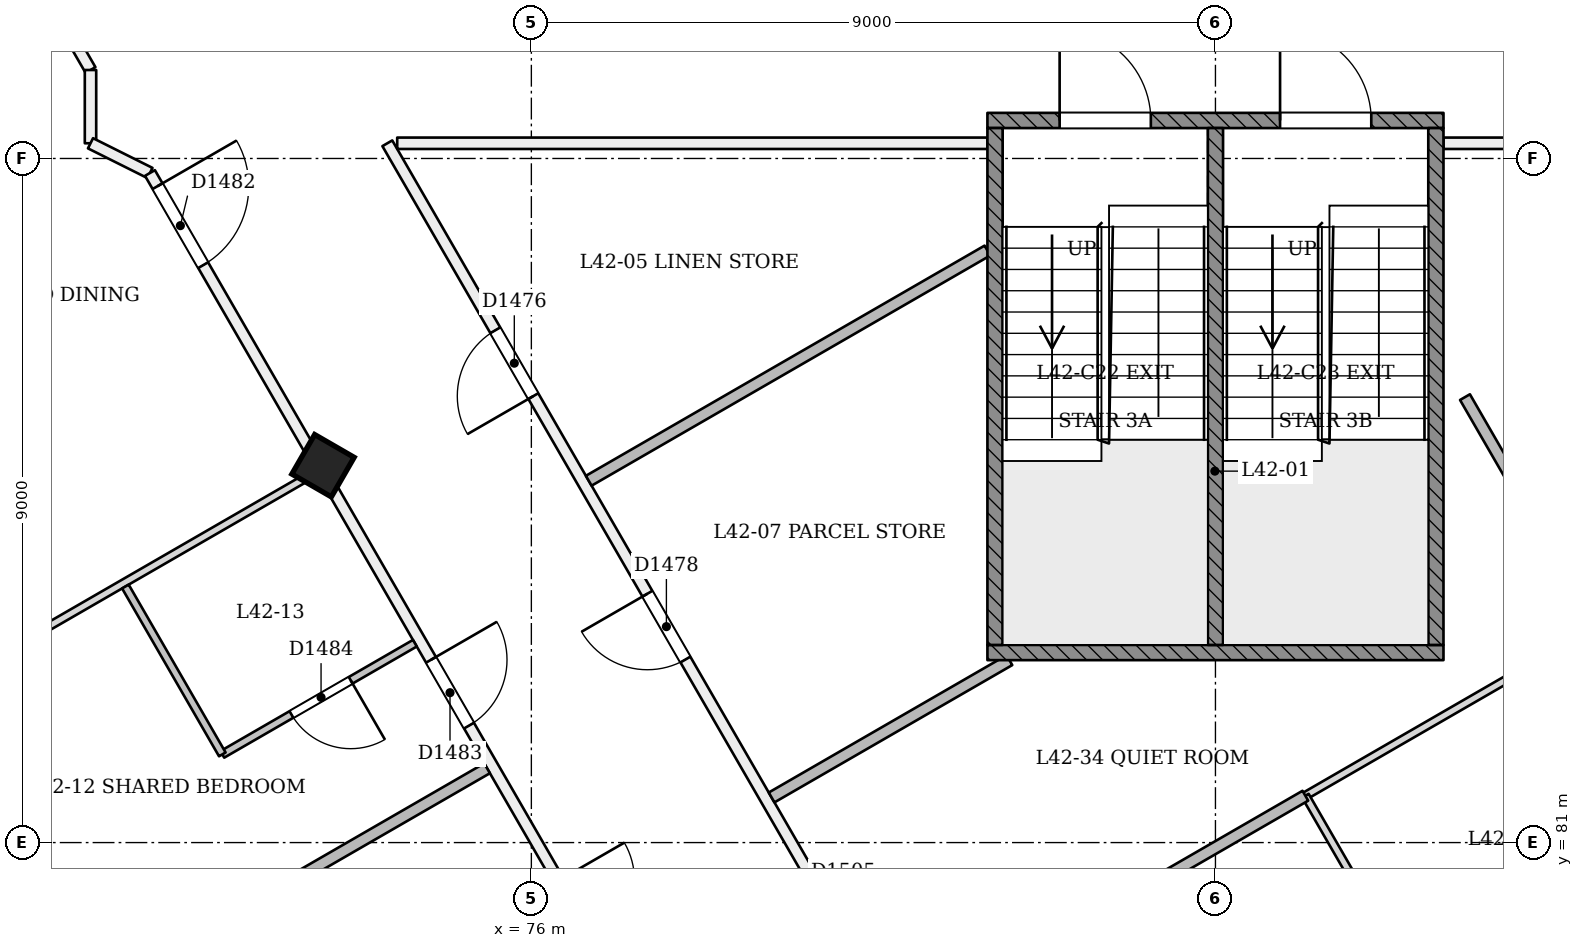
"""IFC4 building model, lengths in metres.
Left out: names, types, materials, properties, quantities, classifications, styles, units other than length and angle.
Written with IfcOpenShell. Run it as: python <this file> out.ifc"""

import sys

from ifc_helpers import new_model, si_unit, direction, frame, frame_2d, origin, origin_2d, place, context, subcontext, project, spatial, rectangle, extrude, element, fill, save


model = new_model("IFC4")
c1 = context("Model", 3, precision=1e-05, world=origin(), true_north=direction((0.0, 1.0)))
c2 = subcontext(c1, "Body", "Model", "MODEL_VIEW")
j1 = project(units=[si_unit("LENGTHUNIT", "METRE"), si_unit("PLANEANGLEUNIT", "RADIAN")], contexts=[c1])
p1 = place(None, origin())
s1 = spatial("IfcSite", under=j1, at=p1, CompositionType="ELEMENT")
p2 = place(p1, origin())
s2 = spatial("IfcBuilding", under=s1, at=p2, CompositionType="ELEMENT")
p3 = place(p2, frame((0.0, 0.0, 163.8)))
s3 = spatial("IfcBuildingStorey", under=s2, at=p3, CompositionType="ELEMENT", Elevation=163.8)
p4 = place(p3, frame((73.232, 85.911, -0.02), z_axis=(0.022212328788, 0.038465252292, 0.999013031354), x_axis=(-0.865637068683, -0.499192077074, 0.038467330417)))
e1 = element("IfcColumn", 1, at=p4, inside=s3, PredefinedType="COLUMN", context=c2, shape_type="SweptSolid", body=[
    extrude(rectangle(XDim=0.6, YDim=0.6, at=origin_2d()), origin(), (0.0, 0.0, 1.0), 3.605),
])
p5 = place(p3, frame((88.0, 90.2, 0.0), z_axis=(0.0, 0.0, 1.0), x_axis=(1.0, 0.0, 0.0)))
e2 = element("IfcWall", 2, at=p5, inside=s3, PredefinedType="PARTITIONING", context=c2, shape_type="SweptSolid", body=[
    extrude(rectangle(XDim=7.765, YDim=0.15, at=frame_2d((3.882, 0.0))), origin(), (0.0, 0.0, 1.0), 3.15),
])
p6 = place(p5, frame((1.674, 0.0, 0.0)))
e3 = element("IfcOpeningElement", 3, at=p6, cuts=e2, PredefinedType="OPENING", context=c2, shape_type="SweptSolid", body=[
    extrude(rectangle(XDim=1.0, YDim=2.1, at=frame_2d((0.5, 1.05))), frame((0.0, 0.085, 0.0), z_axis=(0.0, -1.0, 0.0), x_axis=(1.0, 0.0, 0.0)), (0.0, 0.0, 1.0), 0.171),
])
p7 = place(p3, frame((95.895, 90.2, 0.0), z_axis=(0.0, 0.0, 1.0), x_axis=(-0.499998870956, -0.866026055637, 0.0)))
e4 = element("IfcWall", 4, at=p7, inside=s3, PredefinedType="PARTITIONING", context=c2, shape_type="SweptSolid", body=[
    extrude(rectangle(XDim=21.79, YDim=0.15, at=frame_2d((10.895, 0.0))), origin(), (0.0, 0.0, 1.0), 3.15),
])
p8 = place(p7, frame((2.982, 0.0, 0.0)))
e5 = element("IfcOpeningElement", 5, at=p8, cuts=e4, PredefinedType="OPENING", context=c2, shape_type="SweptSolid", body=[
    extrude(rectangle(XDim=0.9, YDim=2.1, at=frame_2d((0.45, 1.05))), frame((0.0, 0.085, 0.0), z_axis=(0.0, -1.0, 0.0), x_axis=(1.0, 0.0, 0.0)), (0.0, 0.0, 1.0), 0.171),
])
p9 = place(p7, frame((11.061, 0.0, 0.0)))
e6 = element("IfcOpeningElement", 6, at=p9, cuts=e4, PredefinedType="OPENING", context=c2, shape_type="SweptSolid", body=[
    extrude(rectangle(XDim=0.9, YDim=2.1, at=frame_2d((0.45, 1.05))), frame((0.0, 0.085, 0.0), z_axis=(0.0, -1.0, 0.0), x_axis=(1.0, 0.0, 0.0)), (0.0, 0.0, 1.0), 0.171),
])
p10 = place(p7, frame((17.72, 0.0, 0.0)))
e7 = element("IfcOpeningElement", 7, at=p10, cuts=e4, PredefinedType="OPENING", context=c2, shape_type="SweptSolid", body=[
    extrude(rectangle(XDim=1.0, YDim=2.1, at=frame_2d((0.5, 1.05))), frame((0.0, 0.085, 0.0), z_axis=(0.0, -1.0, 0.0), x_axis=(1.0, 0.0, 0.0)), (0.0, 0.0, 1.0), 0.171),
])
p11 = place(p3, frame((84.935, 71.442, 0.0), z_axis=(0.0, 0.0, 1.0), x_axis=(-0.499995323145, 0.866028103951, 0.0)))
e8 = element("IfcWall", 8, at=p11, inside=s3, PredefinedType="PARTITIONING", context=c2, shape_type="SweptSolid", body=[
    extrude(rectangle(XDim=21.66, YDim=0.15, at=frame_2d((10.83, 0.0))), origin(), (0.0, 0.0, 1.0), 3.15),
])
p12 = place(p11, frame((17.819, 0.0, 0.0)))
e9 = element("IfcOpeningElement", 9, at=p12, cuts=e8, PredefinedType="OPENING", context=c2, shape_type="SweptSolid", body=[
    extrude(rectangle(XDim=1.0, YDim=2.1, at=frame_2d((0.5, 1.05))), frame((0.0, 0.085, 0.0), z_axis=(0.0, -1.0, 0.0), x_axis=(1.0, 0.0, 0.0)), (0.0, 0.0, 1.0), 0.171),
])
p13 = place(p11, frame((13.817, 0.0, 0.0)))
e10 = element("IfcOpeningElement", 10, at=p13, cuts=e8, PredefinedType="OPENING", context=c2, shape_type="SweptSolid", body=[
    extrude(rectangle(XDim=1.0, YDim=2.1, at=frame_2d((0.5, 1.05))), frame((0.0, 0.085, 0.0), z_axis=(0.0, -1.0, 0.0), x_axis=(1.0, 0.0, 0.0)), (0.0, 0.0, 1.0), 0.171),
])
p14 = place(p11, frame((9.162, 0.0, 0.0)))
e11 = element("IfcOpeningElement", 11, at=p14, cuts=e8, PredefinedType="OPENING", context=c2, shape_type="SweptSolid", body=[
    extrude(rectangle(XDim=1.0, YDim=2.1, at=frame_2d((0.5, 1.05))), frame((0.0, 0.085, 0.0), z_axis=(0.0, -1.0, 0.0), x_axis=(1.0, 0.0, 0.0)), (0.0, 0.0, 1.0), 0.171),
])
p15 = place(p11, frame((5.788, 0.0, 0.0)))
e12 = element("IfcOpeningElement", 12, at=p15, cuts=e8, PredefinedType="OPENING", context=c2, shape_type="SweptSolid", body=[
    extrude(rectangle(XDim=1.0, YDim=2.1, at=frame_2d((0.5, 1.05))), frame((0.0, 0.085, 0.0), z_axis=(0.0, -1.0, 0.0), x_axis=(1.0, 0.0, 0.0)), (0.0, 0.0, 1.0), 0.171),
])
p16 = place(p3, frame((74.235, 90.2, 0.0), z_axis=(0.0, 0.0, 1.0), x_axis=(1.0, 0.0, 0.0)))
e13 = element("IfcWall", 13, at=p16, inside=s3, PredefinedType="PARTITIONING", context=c2, shape_type="SweptSolid", body=[
    extrude(rectangle(XDim=7.765, YDim=0.15, at=frame_2d((3.882, 0.0))), origin(), (0.0, 0.0, 1.0), 3.15),
])
p17 = place(p3, frame((66.482, 97.603, 0.0), z_axis=(0.0, 0.0, 1.0), x_axis=(0.499995303914, -0.866028115054, 0.0)))
e14 = element("IfcWall", 14, at=p17, inside=s3, PredefinedType="PARTITIONING", context=c2, shape_type="SweptSolid", body=[
    extrude(rectangle(XDim=7.436, YDim=0.15, at=frame_2d((3.718, 0.0))), origin(), (0.0, 0.0, 1.0), 2.75),
])
p18 = place(p17, frame((0.571, 0.0, 0.0)))
e15 = element("IfcOpeningElement", 15, at=p18, cuts=e14, PredefinedType="OPENING", context=c2, shape_type="SweptSolid", body=[
    extrude(rectangle(XDim=1.1, YDim=2.1, at=frame_2d((0.55, 1.05))), frame((0.0, 0.085, 0.0), z_axis=(0.0, -1.0, 0.0), x_axis=(1.0, 0.0, 0.0)), (0.0, 0.0, 1.0), 0.171),
])
p19 = place(p3, frame((70.2, 91.164, 0.0), z_axis=(0.0, 0.0, 1.0), x_axis=(0.0, -1.0, 0.0)))
e16 = element("IfcWall", 16, at=p19, inside=s3, PredefinedType="PARTITIONING", context=c2, shape_type="SweptSolid", body=[
    extrude(rectangle(XDim=0.964, YDim=0.15, at=frame_2d((0.482, 0.0))), origin(), (0.0, 0.0, 1.0), 3.15),
])
p20 = place(p3, frame((70.2, 90.2, 0.0), z_axis=(0.0, 0.0, 1.0), x_axis=(0.89453884087, -0.44699022604, 0.0)))
e17 = element("IfcWall", 17, at=p20, inside=s3, PredefinedType="PARTITIONING", context=c2, shape_type="SweptSolid", body=[
    extrude(rectangle(XDim=0.875, YDim=0.15, at=frame_2d((0.437, 0.0))), origin(), (0.0, 0.0, 1.0), 3.15),
])
p21 = place(p3, frame((70.982, 89.809, 0.0), z_axis=(0.0, 0.0, 1.0), x_axis=(0.500000607917, -0.866025052803, 0.0)))
e18 = element("IfcWall", 18, at=p21, inside=s3, PredefinedType="PARTITIONING", context=c2, shape_type="SweptSolid", body=[
    extrude(rectangle(XDim=28.036, YDim=0.15, at=frame_2d((14.018, 0.0))), origin(), (0.0, 0.0, 1.0), 2.75),
])
p22 = place(p21, frame((0.2, 0.0, 0.0)))
e19 = element("IfcOpeningElement", 19, at=p22, cuts=e18, PredefinedType="OPENING", context=c2, shape_type="SweptSolid", body=[
    extrude(rectangle(XDim=1.2, YDim=2.1, at=frame_2d((0.6, 1.05))), frame((0.0, 0.085, 0.0), z_axis=(0.0, -1.0, 0.0), x_axis=(1.0, 0.0, 0.0)), (0.0, 0.0, 1.0), 0.171),
])
p23 = place(p21, frame((7.395, 0.0, 0.0)))
e20 = element("IfcOpeningElement", 20, at=p23, cuts=e18, PredefinedType="OPENING", context=c2, shape_type="SweptSolid", body=[
    extrude(rectangle(XDim=1.0, YDim=2.1, at=frame_2d((0.5, 1.05))), frame((0.0, 0.085, 0.0), z_axis=(0.0, -1.0, 0.0), x_axis=(1.0, 0.0, 0.0)), (0.0, 0.0, 1.0), 0.171),
])
p24 = place(p21, frame((10.75, 0.0, 0.0)))
e21 = element("IfcOpeningElement", 21, at=p24, cuts=e18, PredefinedType="OPENING", context=c2, shape_type="SweptSolid", body=[
    extrude(rectangle(XDim=1.0, YDim=2.1, at=frame_2d((0.5, 1.05))), frame((0.0, 0.085, 0.0), z_axis=(0.0, -1.0, 0.0), x_axis=(1.0, 0.0, 0.0)), (0.0, 0.0, 1.0), 0.171),
])
p25 = place(p21, frame((16.28, 0.0, 0.0)))
e22 = element("IfcOpeningElement", 22, at=p25, cuts=e18, PredefinedType="OPENING", context=c2, shape_type="SweptSolid", body=[
    extrude(rectangle(XDim=1.0, YDim=2.1, at=frame_2d((0.5, 1.05))), frame((0.0, 0.085, 0.0), z_axis=(0.0, -1.0, 0.0), x_axis=(1.0, 0.0, 0.0)), (0.0, 0.0, 1.0), 0.171),
])
p26 = place(p21, frame((18.72, 0.0, 0.0)))
e23 = element("IfcOpeningElement", 23, at=p26, cuts=e18, PredefinedType="OPENING", context=c2, shape_type="SweptSolid", body=[
    extrude(rectangle(XDim=1.0, YDim=2.1, at=frame_2d((0.5, 1.05))), frame((0.0, 0.085, 0.0), z_axis=(0.0, -1.0, 0.0), x_axis=(1.0, 0.0, 0.0)), (0.0, 0.0, 1.0), 0.171),
])
p27 = place(p21, frame((26.228, 0.0, 0.0)))
e24 = element("IfcOpeningElement", 24, at=p27, cuts=e18, PredefinedType="OPENING", context=c2, shape_type="SweptSolid", body=[
    extrude(rectangle(XDim=1.2, YDim=2.1, at=frame_2d((0.6, 1.05))), frame((0.0, 0.085, 0.0), z_axis=(0.0, -1.0, 0.0), x_axis=(1.0, 0.0, 0.0)), (0.0, 0.0, 1.0), 0.171),
])
p28 = place(p3, frame((85.065, 65.642, 0.0), z_axis=(0.0, 0.0, 1.0), x_axis=(0.500001650589, 0.866024450814, 0.0)))
e25 = element("IfcWall", 25, at=p28, inside=s3, PredefinedType="PARTITIONING", context=c2, shape_type="SweptSolid", body=[
    extrude(rectangle(XDim=27.906, YDim=0.15, at=frame_2d((13.953, 0.0))), origin(), (0.0, 0.0, 1.0), 2.75),
])
p29 = place(p28, frame((2.656, 0.0, 0.0)))
e26 = element("IfcOpeningElement", 26, at=p29, cuts=e25, PredefinedType="OPENING", context=c2, shape_type="SweptSolid", body=[
    extrude(rectangle(XDim=1.0, YDim=2.1, at=frame_2d((0.5, 1.05))), frame((0.0, 0.085, 0.0), z_axis=(0.0, -1.0, 0.0), x_axis=(1.0, 0.0, 0.0)), (0.0, 0.0, 1.0), 0.171),
])
p30 = place(p28, frame((8.185, 0.0, 0.0)))
e27 = element("IfcOpeningElement", 27, at=p30, cuts=e25, PredefinedType="OPENING", context=c2, shape_type="SweptSolid", body=[
    extrude(rectangle(XDim=1.0, YDim=2.1, at=frame_2d((0.5, 1.05))), frame((0.0, 0.085, 0.0), z_axis=(0.0, -1.0, 0.0), x_axis=(1.0, 0.0, 0.0)), (0.0, 0.0, 1.0), 0.171),
])
p31 = place(p28, frame((10.626, 0.0, 0.0)))
e28 = element("IfcOpeningElement", 28, at=p31, cuts=e25, PredefinedType="OPENING", context=c2, shape_type="SweptSolid", body=[
    extrude(rectangle(XDim=1.0, YDim=2.1, at=frame_2d((0.5, 1.05))), frame((0.0, 0.085, 0.0), z_axis=(0.0, -1.0, 0.0), x_axis=(1.0, 0.0, 0.0)), (0.0, 0.0, 1.0), 0.171),
])
p32 = place(p28, frame((16.156, 0.0, 0.0)))
e29 = element("IfcOpeningElement", 29, at=p32, cuts=e25, PredefinedType="OPENING", context=c2, shape_type="SweptSolid", body=[
    extrude(rectangle(XDim=1.0, YDim=2.1, at=frame_2d((0.5, 1.05))), frame((0.0, 0.085, 0.0), z_axis=(0.0, -1.0, 0.0), x_axis=(1.0, 0.0, 0.0)), (0.0, 0.0, 1.0), 0.171),
])
p33 = place(p28, frame((19.626, 0.0, 0.0)))
e30 = element("IfcOpeningElement", 30, at=p33, cuts=e25, PredefinedType="OPENING", context=c2, shape_type="SweptSolid", body=[
    extrude(rectangle(XDim=1.0, YDim=2.1, at=frame_2d((0.5, 1.05))), frame((0.0, 0.085, 0.0), z_axis=(0.0, -1.0, 0.0), x_axis=(1.0, 0.0, 0.0)), (0.0, 0.0, 1.0), 0.171),
])
p34 = place(p28, frame((26.235, 0.0, 0.0)))
e31 = element("IfcOpeningElement", 31, at=p34, cuts=e25, PredefinedType="OPENING", context=c2, shape_type="SweptSolid", body=[
    extrude(rectangle(XDim=1.1, YDim=2.1, at=frame_2d((0.55, 1.05))), frame((0.0, 0.085, 0.0), z_axis=(0.0, -1.0, 0.0), x_axis=(1.0, 0.0, 0.0)), (0.0, 0.0, 1.0), 0.171),
])
p35 = place(p3, frame((90.029, 83.837, 0.0), z_axis=(0.0, 0.0, 1.0), x_axis=(-0.866011499294, -0.50002408251, 0.0)))
e32 = element("IfcWall", 32, at=p35, inside=s3, PredefinedType="PARTITIONING", context=c2, shape_type="SweptSolid", body=[
    extrude(rectangle(XDim=4.461, YDim=0.1, at=frame_2d((2.23, 0.0))), origin(), (0.0, 0.0, 1.0), 3.15),
])
p36 = place(p3, frame((86.183, 81.616, 0.0), z_axis=(0.0, 0.0, 1.0), x_axis=(0.500009360108, -0.866019999656, 0.0)))
e33 = element("IfcWall", 33, at=p36, inside=s3, PredefinedType="PARTITIONING", context=c2, shape_type="SweptSolid", body=[
    extrude(rectangle(XDim=4.641, YDim=0.1, at=frame_2d((2.32, 0.0))), origin(), (0.0, 0.0, 1.0), 3.15),
])
p37 = place(p3, frame((76.755, 85.76, 0.0), z_axis=(0.0, 0.0, 1.0), x_axis=(0.866021793822, 0.500006252586, 0.0)))
e34 = element("IfcWall", 34, at=p37, inside=s3, PredefinedType="PARTITIONING", context=c2, shape_type="SweptSolid", body=[
    extrude(rectangle(XDim=6.057, YDim=0.15, at=frame_2d((3.028, 0.0))), origin(), (0.0, 0.0, 1.0), 3.15),
])
p38 = place(p3, frame((88.283, 86.86, 0.0), z_axis=(0.0, 0.0, 1.0), x_axis=(0.499974664501, -0.866040030748, 0.0)))
e35 = element("IfcWall", 35, at=p38, inside=s3, PredefinedType="PARTITIONING", context=c2, shape_type="SweptSolid", body=[
    extrude(rectangle(XDim=3.491, YDim=0.15, at=frame_2d((1.746, 0.0))), origin(), (0.0, 0.0, 1.0), 3.15),
])
p39 = place(p3, frame((79.161, 81.594, 0.0), z_axis=(0.0, 0.0, 1.0), x_axis=(0.866017903742, 0.500012990229, 0.0)))
e36 = element("IfcWall", 36, at=p39, inside=s3, PredefinedType="PARTITIONING", context=c2, shape_type="SweptSolid", body=[
    extrude(rectangle(XDim=3.613, YDim=0.15, at=frame_2d((1.806, 0.0))), origin(), (0.0, 0.0, 1.0), 3.15),
])
p40 = place(p3, frame((67.69, 82.712, 0.0), z_axis=(0.0, 0.0, 1.0), x_axis=(0.866032601554, 0.49998753289, 0.0)))
e37 = element("IfcWall", 37, at=p40, inside=s3, PredefinedType="PARTITIONING", context=c2, shape_type="SweptSolid", body=[
    extrude(rectangle(XDim=6.325, YDim=0.1, at=frame_2d((3.163, 0.0))), origin(), (0.0, 0.0, 1.0), 2.65),
])
p41 = place(p3, frame((74.467, 83.623, 0.0), z_axis=(0.0, 0.0, 1.0), x_axis=(-0.86601045545, -0.500025890382, 0.0)))
e38 = element("IfcWall", 38, at=p41, inside=s3, PredefinedType="PARTITIONING", context=c2, shape_type="SweptSolid", body=[
    extrude(rectangle(XDim=2.925, YDim=0.1, at=frame_2d((1.462, 0.0))), origin(), (0.0, 0.0, 1.0), 3.15),
])
p42 = place(p41, frame((0.975, 0.0, 0.0)))
e39 = element("IfcOpeningElement", 39, at=p42, cuts=e38, PredefinedType="OPENING", context=c2, shape_type="SweptSolid", body=[
    extrude(rectangle(XDim=0.9, YDim=2.1, at=frame_2d((0.45, 1.05))), frame((0.0, 0.061, 0.0), z_axis=(0.0, -1.0, 0.0), x_axis=(1.0, 0.0, 0.0)), (0.0, 0.0, 1.0), 0.121),
])
p43 = place(p3, frame((71.934, 82.16, 0.0), z_axis=(0.0, 0.0, 1.0), x_axis=(-0.499948979701, 0.866054858364, 0.0)))
e40 = element("IfcWall", 40, at=p43, inside=s3, PredefinedType="PARTITIONING", context=c2, shape_type="SweptSolid", body=[
    extrude(rectangle(XDim=2.55, YDim=0.1, at=frame_2d((1.275, 0.0))), origin(), (0.0, 0.0, 1.0), 2.75),
])
p44 = place(p3, frame((69.922, 78.805, 0.0), z_axis=(0.0, 0.0, 1.0), x_axis=(0.866025401434, 0.500000004071, 0.0)))
e41 = element("IfcWall", 41, at=p44, inside=s3, PredefinedType="PARTITIONING", context=c2, shape_type="SweptSolid", body=[
    extrude(rectangle(XDim=6.345, YDim=0.15, at=frame_2d((3.173, 0.0))), origin(), (0.0, 0.0, 1.0), 2.65),
])
p45 = place(p3, frame((80.906, 78.57, 0.0), z_axis=(0.0, 0.0, 1.0), x_axis=(0.866020094525, 0.500009195793, 0.0)))
e42 = element("IfcWall", 42, at=p45, inside=s3, PredefinedType="PARTITIONING", context=c2, shape_type="SweptSolid", body=[
    extrude(rectangle(XDim=6.093, YDim=0.15, at=frame_2d((3.046, 0.0))), origin(), (0.0, 0.0, 1.0), 3.15),
])
p46 = place(p3, frame((82.0, 90.5, 0.0), z_axis=(0.0, 0.0, 1.0), x_axis=(1.0, 0.0, 0.0)))
e43 = element("IfcWall", 43, at=p46, inside=s3, PredefinedType="SOLIDWALL", context=c2, shape_type="SweptSolid", body=[
    extrude(rectangle(XDim=6.0, YDim=0.2, at=frame_2d((3.0, 0.0))), origin(), (0.0, 0.0, 1.0), 3.15),
])
p47 = place(p46, frame((0.95, 0.0, 0.0)))
e44 = element("IfcOpeningElement", 44, at=p47, cuts=e43, PredefinedType="OPENING", context=c2, shape_type="SweptSolid", body=[
    extrude(rectangle(XDim=1.2, YDim=2.1, at=frame_2d((0.6, 1.05))), frame((0.0, 0.11, 0.0), z_axis=(0.0, -1.0, 0.0), x_axis=(1.0, 0.0, 0.0)), (0.0, 0.0, 1.0), 0.221),
])
p48 = place(p46, frame((3.85, 0.0, 0.0)))
e45 = element("IfcOpeningElement", 45, at=p48, cuts=e43, PredefinedType="OPENING", context=c2, shape_type="SweptSolid", body=[
    extrude(rectangle(XDim=1.2, YDim=2.1, at=frame_2d((0.6, 1.05))), frame((0.0, 0.11, 0.0), z_axis=(0.0, -1.0, 0.0), x_axis=(1.0, 0.0, 0.0)), (0.0, 0.0, 1.0), 0.221),
])
p49 = place(p3, frame((82.0, 83.5, 0.0), z_axis=(0.0, 0.0, 1.0), x_axis=(1.0, 0.0, 0.0)))
e46 = element("IfcWall", 46, at=p49, inside=s3, PredefinedType="SOLIDWALL", context=c2, shape_type="SweptSolid", body=[
    extrude(rectangle(XDim=6.0, YDim=0.2, at=frame_2d((3.0, 0.0))), origin(), (0.0, 0.0, 1.0), 3.15),
])
for number, where, z_axis, x_axis in (
    (47, (82.1, 83.6, 0.0), (0.0, 0.0, 1.0), (0.0, 1.0, 0.0)),
    (48, (87.9, 83.6, 0.0), (0.0, 0.0, 1.0), (0.0, 1.0, 0.0)),
    (49, (85.0, 83.6, 0.0), (0.0, 0.0, 1.0), (0.0, 1.0, 0.0)),
):
    element("IfcWall", number, at=place(p3, frame(where, z_axis=z_axis, x_axis=x_axis)), inside=s3, PredefinedType="SOLIDWALL", context=c2, shape_type="SweptSolid", body=[
        extrude(rectangle(XDim=6.8, YDim=0.2, at=frame_2d((3.4, 0.0))), origin(), (0.0, 0.0, 1.0), 3.15),
    ])
p50 = place(p12, origin())
e50 = element("IfcDoor", 50, at=p50, inside=s3, OperationType="SINGLE_SWING_LEFT", PredefinedType="NOTDEFINED", context=c2, shape_type="SweptSolid", body=[
    extrude(rectangle(XDim=1.0, YDim=2.1, at=frame_2d((0.5, 1.05))), frame((0.0, 0.025, 0.0), z_axis=(0.0, -1.0, 0.0), x_axis=(1.0, 0.0, 0.0)), (0.0, 0.0, 1.0), 0.05),
])
fill(e9, e50)
p51 = place(p13, origin())
e51 = element("IfcDoor", 51, at=p51, inside=s3, OperationType="SINGLE_SWING_RIGHT", PredefinedType="NOTDEFINED", context=c2, shape_type="SweptSolid", body=[
    extrude(rectangle(XDim=1.0, YDim=2.1, at=frame_2d((0.5, 1.05))), frame((0.0, 0.025, 0.0), z_axis=(0.0, -1.0, 0.0), x_axis=(1.0, 0.0, 0.0)), (0.0, 0.0, 1.0), 0.05),
])
fill(e10, e51)
p52 = place(p22, origin())
e52 = element("IfcDoor", 52, at=p52, inside=s3, OperationType="SINGLE_SWING_LEFT", PredefinedType="NOTDEFINED", context=c2, shape_type="SweptSolid", body=[
    extrude(rectangle(XDim=1.2, YDim=2.1, at=frame_2d((0.6, 1.05))), frame((0.0, 0.025, 0.0), z_axis=(0.0, -1.0, 0.0), x_axis=(1.0, 0.0, 0.0)), (0.0, 0.0, 1.0), 0.05),
])
fill(e19, e52)
p53 = place(p23, origin())
e53 = element("IfcDoor", 53, at=p53, inside=s3, OperationType="SINGLE_SWING_LEFT", PredefinedType="NOTDEFINED", context=c2, shape_type="SweptSolid", body=[
    extrude(rectangle(XDim=1.0, YDim=2.1, at=frame_2d((0.5, 1.05))), frame((0.0, 0.025, 0.0), z_axis=(0.0, -1.0, 0.0), x_axis=(1.0, 0.0, 0.0)), (0.0, 0.0, 1.0), 0.05),
])
fill(e20, e53)
p54 = place(p42, origin())
e54 = element("IfcDoor", 54, at=p54, inside=s3, OperationType="SINGLE_SWING_LEFT", PredefinedType="NOTDEFINED", context=c2, shape_type="SweptSolid", body=[
    extrude(rectangle(XDim=0.9, YDim=2.1, at=frame_2d((0.45, 1.05))), frame((0.0, 0.025, 0.0), z_axis=(0.0, -1.0, 0.0), x_axis=(1.0, 0.0, 0.0)), (0.0, 0.0, 1.0), 0.05),
])
fill(e39, e54)
p55 = place(p47, origin())
e55 = element("IfcDoor", 55, at=p55, inside=s3, OperationType="SINGLE_SWING_LEFT", PredefinedType="NOTDEFINED", context=c2, shape_type="SweptSolid", body=[
    extrude(rectangle(XDim=1.2, YDim=2.1, at=frame_2d((0.6, 1.05))), frame((0.0, 0.025, 0.0), z_axis=(0.0, -1.0, 0.0), x_axis=(1.0, 0.0, 0.0)), (0.0, 0.0, 1.0), 0.05),
])
fill(e44, e55)
p56 = place(p48, origin())
e56 = element("IfcDoor", 56, at=p56, inside=s3, OperationType="SINGLE_SWING_LEFT", PredefinedType="NOTDEFINED", context=c2, shape_type="SweptSolid", body=[
    extrude(rectangle(XDim=1.2, YDim=2.1, at=frame_2d((0.6, 1.05))), frame((0.0, 0.025, 0.0), z_axis=(0.0, -1.0, 0.0), x_axis=(1.0, 0.0, 0.0)), (0.0, 0.0, 1.0), 0.05),
])
fill(e45, e56)
save(model, sys.argv[1])
